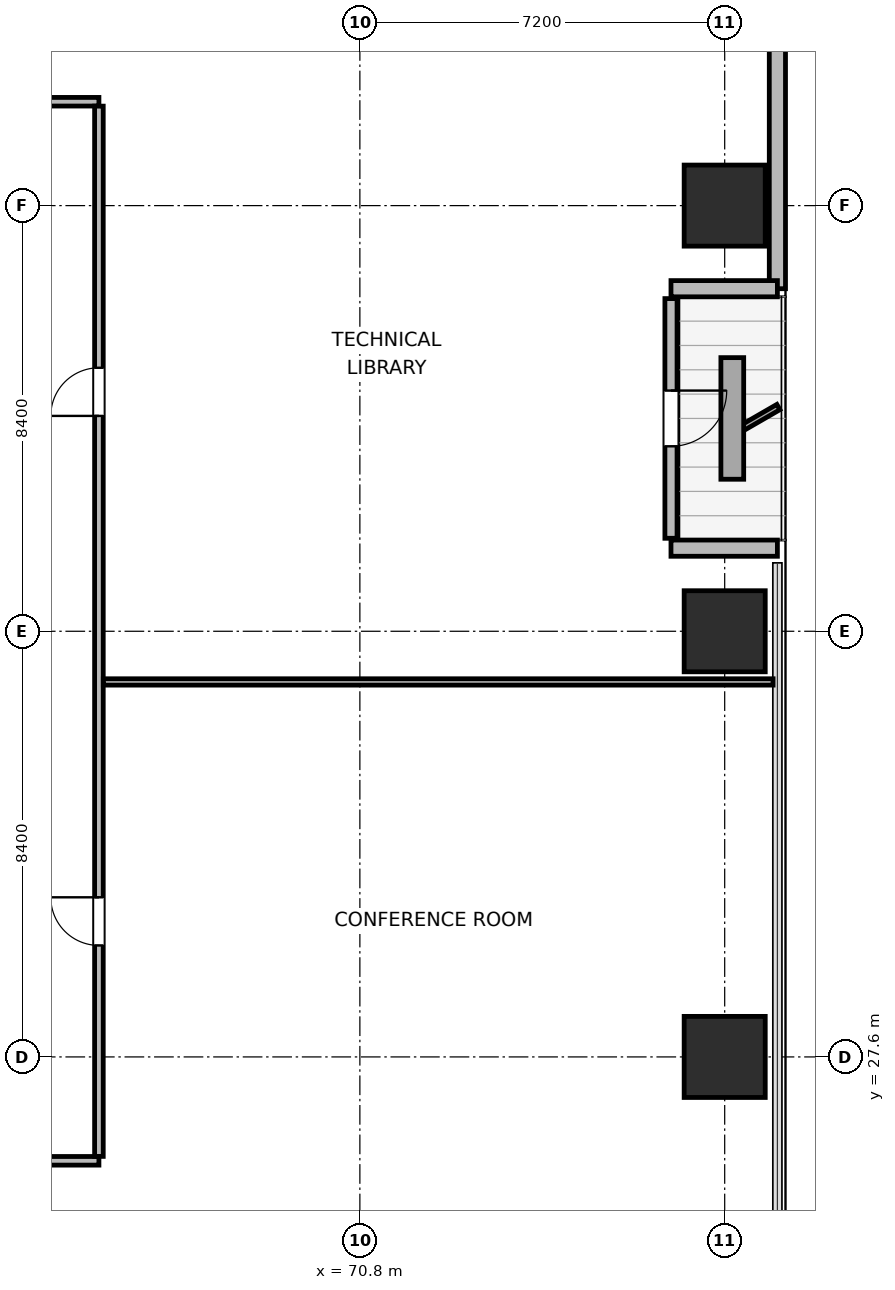
"""IFC4 building model, lengths in metres.
Left out: names, types, materials, properties, quantities, classifications, styles, units other than length and angle.
Written with IfcOpenShell. Run it as: python <this file> out.ifc"""

import sys

from ifc_helpers import new_model, si_unit, direction, frame, frame_2d, origin, origin_2d, place, context, subcontext, project, spatial, rectangle, extrude, element, fill, save


model = new_model("IFC4")
c1 = context("Model", 3, precision=1e-05, world=origin(), true_north=direction((0.0, 1.0)))
c2 = subcontext(c1, "Body", "Model", "MODEL_VIEW")
j1 = project(units=[si_unit("LENGTHUNIT", "METRE"), si_unit("PLANEANGLEUNIT", "RADIAN")], contexts=[c1])
p1 = place(None, origin())
s1 = spatial("IfcSite", under=j1, at=p1, CompositionType="ELEMENT")
p2 = place(p1, origin())
s2 = spatial("IfcBuilding", under=s1, at=p2, CompositionType="ELEMENT")
p3 = place(p2, frame((0.0, 0.0, 25.5)))
s3 = spatial("IfcBuildingStorey", under=s2, at=p3, CompositionType="ELEMENT", Elevation=25.5)
for number, where, z_axis, x_axis in (
    (1, (78.0, 27.6, 0.0), (0.0, 0.0, 1.0), (1.0, 0.0, 0.0)),
    (2, (78.0, 36.0, 0.0), (0.0, 0.0, 1.0), (1.0, 0.0, 0.0)),
    (3, (78.0, 44.4, 0.0), (0.0, 0.0, 1.0), (1.0, 0.0, 0.0)),
):
    element("IfcColumn", number, at=place(p3, frame(where, z_axis=z_axis, x_axis=x_axis)), inside=s3, PredefinedType="COLUMN", context=c2, shape_type="SweptSolid", body=[
        extrude(rectangle(XDim=1.6, YDim=1.6, at=origin_2d()), origin(), (0.0, 0.0, 1.0), 3.9),
    ])
p4 = place(p3, frame((79.04, 56.979, 0.0), z_axis=(0.0, 0.0, 1.0), x_axis=(0.0, -1.0, 0.0)))
e4 = element("IfcWall", 4, at=p4, inside=s3, PredefinedType="SOLIDWALL", context=c2, shape_type="SweptSolid", body=[
    extrude(rectangle(XDim=14.219, YDim=0.32, at=frame_2d((7.109, 0.0))), origin(), (0.0, 0.0, 1.0), 3.64),
])
p5 = place(p3, frame((79.04, 42.76, 0.0), z_axis=(0.0, 0.0, 1.0), x_axis=(-1.0, 0.0, 0.0)))
e5 = element("IfcWall", 5, at=p5, inside=s3, PredefinedType="SOLIDWALL", context=c2, shape_type="SweptSolid", body=[
    extrude(rectangle(XDim=2.1, YDim=0.32, at=frame_2d((1.05, 0.0))), origin(), (0.0, 0.0, 1.0), 2.875),
])
p6 = place(p3, frame((76.94, 42.565, 0.0), z_axis=(0.0, 0.0, 1.0), x_axis=(0.0, -1.0, 0.0)))
e6 = element("IfcWall", 6, at=p6, inside=s3, PredefinedType="SOLIDWALL", context=c2, shape_type="SweptSolid", body=[
    extrude(rectangle(XDim=4.73, YDim=0.24, at=frame_2d((2.365, 0.0))), origin(), (0.0, 0.0, 1.0), 3.162),
])
p7 = place(p6, frame((1.815, 0.0, 0.0)))
e7 = element("IfcOpeningElement", 7, at=p7, cuts=e6, PredefinedType="OPENING", context=c2, shape_type="SweptSolid", body=[
    extrude(rectangle(XDim=1.1, YDim=2.04, at=frame_2d((0.55, 1.02))), frame((0.0, 0.13, 0.0), z_axis=(0.0, -1.0, 0.0), x_axis=(1.0, 0.0, 0.0)), (0.0, 0.0, 1.0), 0.26),
])
p8 = place(p3, frame((76.94, 37.64, 0.0), z_axis=(0.0, 0.0, 1.0), x_axis=(1.0, 0.0, 0.0)))
e8 = element("IfcWall", 8, at=p8, inside=s3, PredefinedType="SOLIDWALL", context=c2, shape_type="SweptSolid", body=[
    extrude(rectangle(XDim=2.1, YDim=0.32, at=frame_2d((1.05, 0.0))), origin(), (0.0, 0.0, 1.0), 2.875),
])
p9 = place(p3, frame((30.35, 25.55, 0.0), z_axis=(0.0, 0.0, 1.0), x_axis=(1.0, 0.0, 0.0)))
e9 = element("IfcWall", 9, at=p9, inside=s3, PredefinedType="PARTITIONING", context=c2, shape_type="SweptSolid", body=[
    extrude(rectangle(XDim=35.3, YDim=0.17, at=frame_2d((17.65, 0.0))), origin(), (0.0, 0.0, 1.0), 3.64),
])
p10 = place(p9, frame((8.35, 0.0, 0.0)))
e10 = element("IfcOpeningElement", 10, at=p10, cuts=e9, PredefinedType="OPENING", context=c2, shape_type="SweptSolid", body=[
    extrude(rectangle(XDim=0.95, YDim=2.04, at=frame_2d((0.475, 1.02))), frame((0.0, 0.095, 0.0), z_axis=(0.0, -1.0, 0.0), x_axis=(1.0, 0.0, 0.0)), (0.0, 0.0, 1.0), 0.19),
])
p11 = place(p9, frame((26.0, 0.0, 0.0)))
e11 = element("IfcOpeningElement", 11, at=p11, cuts=e9, PredefinedType="OPENING", context=c2, shape_type="SweptSolid", body=[
    extrude(rectangle(XDim=0.95, YDim=2.04, at=frame_2d((0.475, 1.02))), frame((0.0, 0.095, 0.0), z_axis=(0.0, -1.0, 0.0), x_axis=(1.0, 0.0, 0.0)), (0.0, 0.0, 1.0), 0.19),
])
p12 = place(p3, frame((30.35, 46.45, 0.0), z_axis=(0.0, 0.0, 1.0), x_axis=(1.0, 0.0, 0.0)))
e12 = element("IfcWall", 12, at=p12, inside=s3, PredefinedType="PARTITIONING", context=c2, shape_type="SweptSolid", body=[
    extrude(rectangle(XDim=35.3, YDim=0.17, at=frame_2d((17.65, 0.0))), origin(), (0.0, 0.0, 1.0), 3.64),
])
p13 = place(p12, frame((6.21, 0.0, 0.0)))
e13 = element("IfcOpeningElement", 13, at=p13, cuts=e12, PredefinedType="OPENING", context=c2, shape_type="SweptSolid", body=[
    extrude(rectangle(XDim=0.95, YDim=2.04, at=frame_2d((0.475, 1.02))), frame((0.0, 0.095, 0.0), z_axis=(0.0, -1.0, 0.0), x_axis=(1.0, 0.0, 0.0)), (0.0, 0.0, 1.0), 0.19),
])
p14 = place(p12, frame((15.38, 0.0, 0.0)))
e14 = element("IfcOpeningElement", 14, at=p14, cuts=e12, PredefinedType="OPENING", context=c2, shape_type="SweptSolid", body=[
    extrude(rectangle(XDim=0.95, YDim=2.04, at=frame_2d((0.475, 1.02))), frame((0.0, 0.095, 0.0), z_axis=(0.0, -1.0, 0.0), x_axis=(1.0, 0.0, 0.0)), (0.0, 0.0, 1.0), 0.19),
])
p15 = place(p12, frame((26.345, 0.0, 0.0)))
e15 = element("IfcOpeningElement", 15, at=p15, cuts=e12, PredefinedType="OPENING", context=c2, shape_type="SweptSolid", body=[
    extrude(rectangle(XDim=0.95, YDim=2.04, at=frame_2d((0.475, 1.02))), frame((0.0, 0.095, 0.0), z_axis=(0.0, -1.0, 0.0), x_axis=(1.0, 0.0, 0.0)), (0.0, 0.0, 1.0), 0.19),
])
p16 = place(p3, frame((65.65, 25.637, 0.0), z_axis=(0.0, 0.0, 1.0), x_axis=(0.0, 1.0, 0.0)))
e16 = element("IfcWall", 16, at=p16, inside=s3, PredefinedType="PARTITIONING", context=c2, shape_type="SweptSolid", body=[
    extrude(rectangle(XDim=20.726, YDim=0.17, at=frame_2d((10.363, 0.0))), origin(), (0.0, 0.0, 1.0), 3.64),
])
p17 = place(p16, frame((4.163, 0.0, 0.0)))
e17 = element("IfcOpeningElement", 17, at=p17, cuts=e16, PredefinedType="OPENING", context=c2, shape_type="SweptSolid", body=[
    extrude(rectangle(XDim=0.95, YDim=2.04, at=frame_2d((0.475, 1.02))), frame((0.0, 0.095, 0.0), z_axis=(0.0, -1.0, 0.0), x_axis=(1.0, 0.0, 0.0)), (0.0, 0.0, 1.0), 0.19),
])
p18 = place(p16, frame((14.613, 0.0, 0.0)))
e18 = element("IfcOpeningElement", 18, at=p18, cuts=e16, PredefinedType="OPENING", context=c2, shape_type="SweptSolid", body=[
    extrude(rectangle(XDim=0.95, YDim=2.04, at=frame_2d((0.475, 1.02))), frame((0.0, 0.095, 0.0), z_axis=(0.0, -1.0, 0.0), x_axis=(1.0, 0.0, 0.0)), (0.0, 0.0, 1.0), 0.19),
])
p19 = place(p3, frame((65.737, 35.0, 0.0), z_axis=(0.0, 0.0, 1.0), x_axis=(1.0, 0.0, 0.0)))
e19 = element("IfcWall", 19, at=p19, inside=s3, PredefinedType="PARTITIONING", context=c2, shape_type="SweptSolid", body=[
    extrude(rectangle(XDim=13.218, YDim=0.125, at=frame_2d((6.609, 0.0))), origin(), (0.0, 0.0, 1.0), 3.64),
])
p20 = place(p7, origin())
e20 = element("IfcDoor", 20, at=p20, inside=s3, OperationType="SINGLE_SWING_LEFT", PredefinedType="DOOR", context=c2, shape_type="SweptSolid", body=[
    extrude(rectangle(XDim=1.1, YDim=2.04, at=frame_2d((0.55, 1.02))), frame((0.0, 0.025, 0.0), z_axis=(0.0, -1.0, 0.0), x_axis=(1.0, 0.0, 0.0)), (0.0, 0.0, 1.0), 0.05),
])
fill(e7, e20)
p21 = place(p17, origin())
e21 = element("IfcDoor", 21, at=p21, inside=s3, OperationType="SINGLE_SWING_RIGHT", PredefinedType="DOOR", context=c2, shape_type="SweptSolid", body=[
    extrude(rectangle(XDim=0.95, YDim=2.04, at=frame_2d((0.475, 1.02))), frame((0.0, 0.025, 0.0), z_axis=(0.0, -1.0, 0.0), x_axis=(1.0, 0.0, 0.0)), (0.0, 0.0, 1.0), 0.05),
])
fill(e17, e21)
p22 = place(p18, origin())
e22 = element("IfcDoor", 22, at=p22, inside=s3, OperationType="SINGLE_SWING_LEFT", PredefinedType="DOOR", context=c2, shape_type="SweptSolid", body=[
    extrude(rectangle(XDim=0.95, YDim=2.04, at=frame_2d((0.475, 1.02))), frame((0.0, 0.025, 0.0), z_axis=(0.0, -1.0, 0.0), x_axis=(1.0, 0.0, 0.0)), (0.0, 0.0, 1.0), 0.05),
])
fill(e18, e22)
save(model, sys.argv[1])
